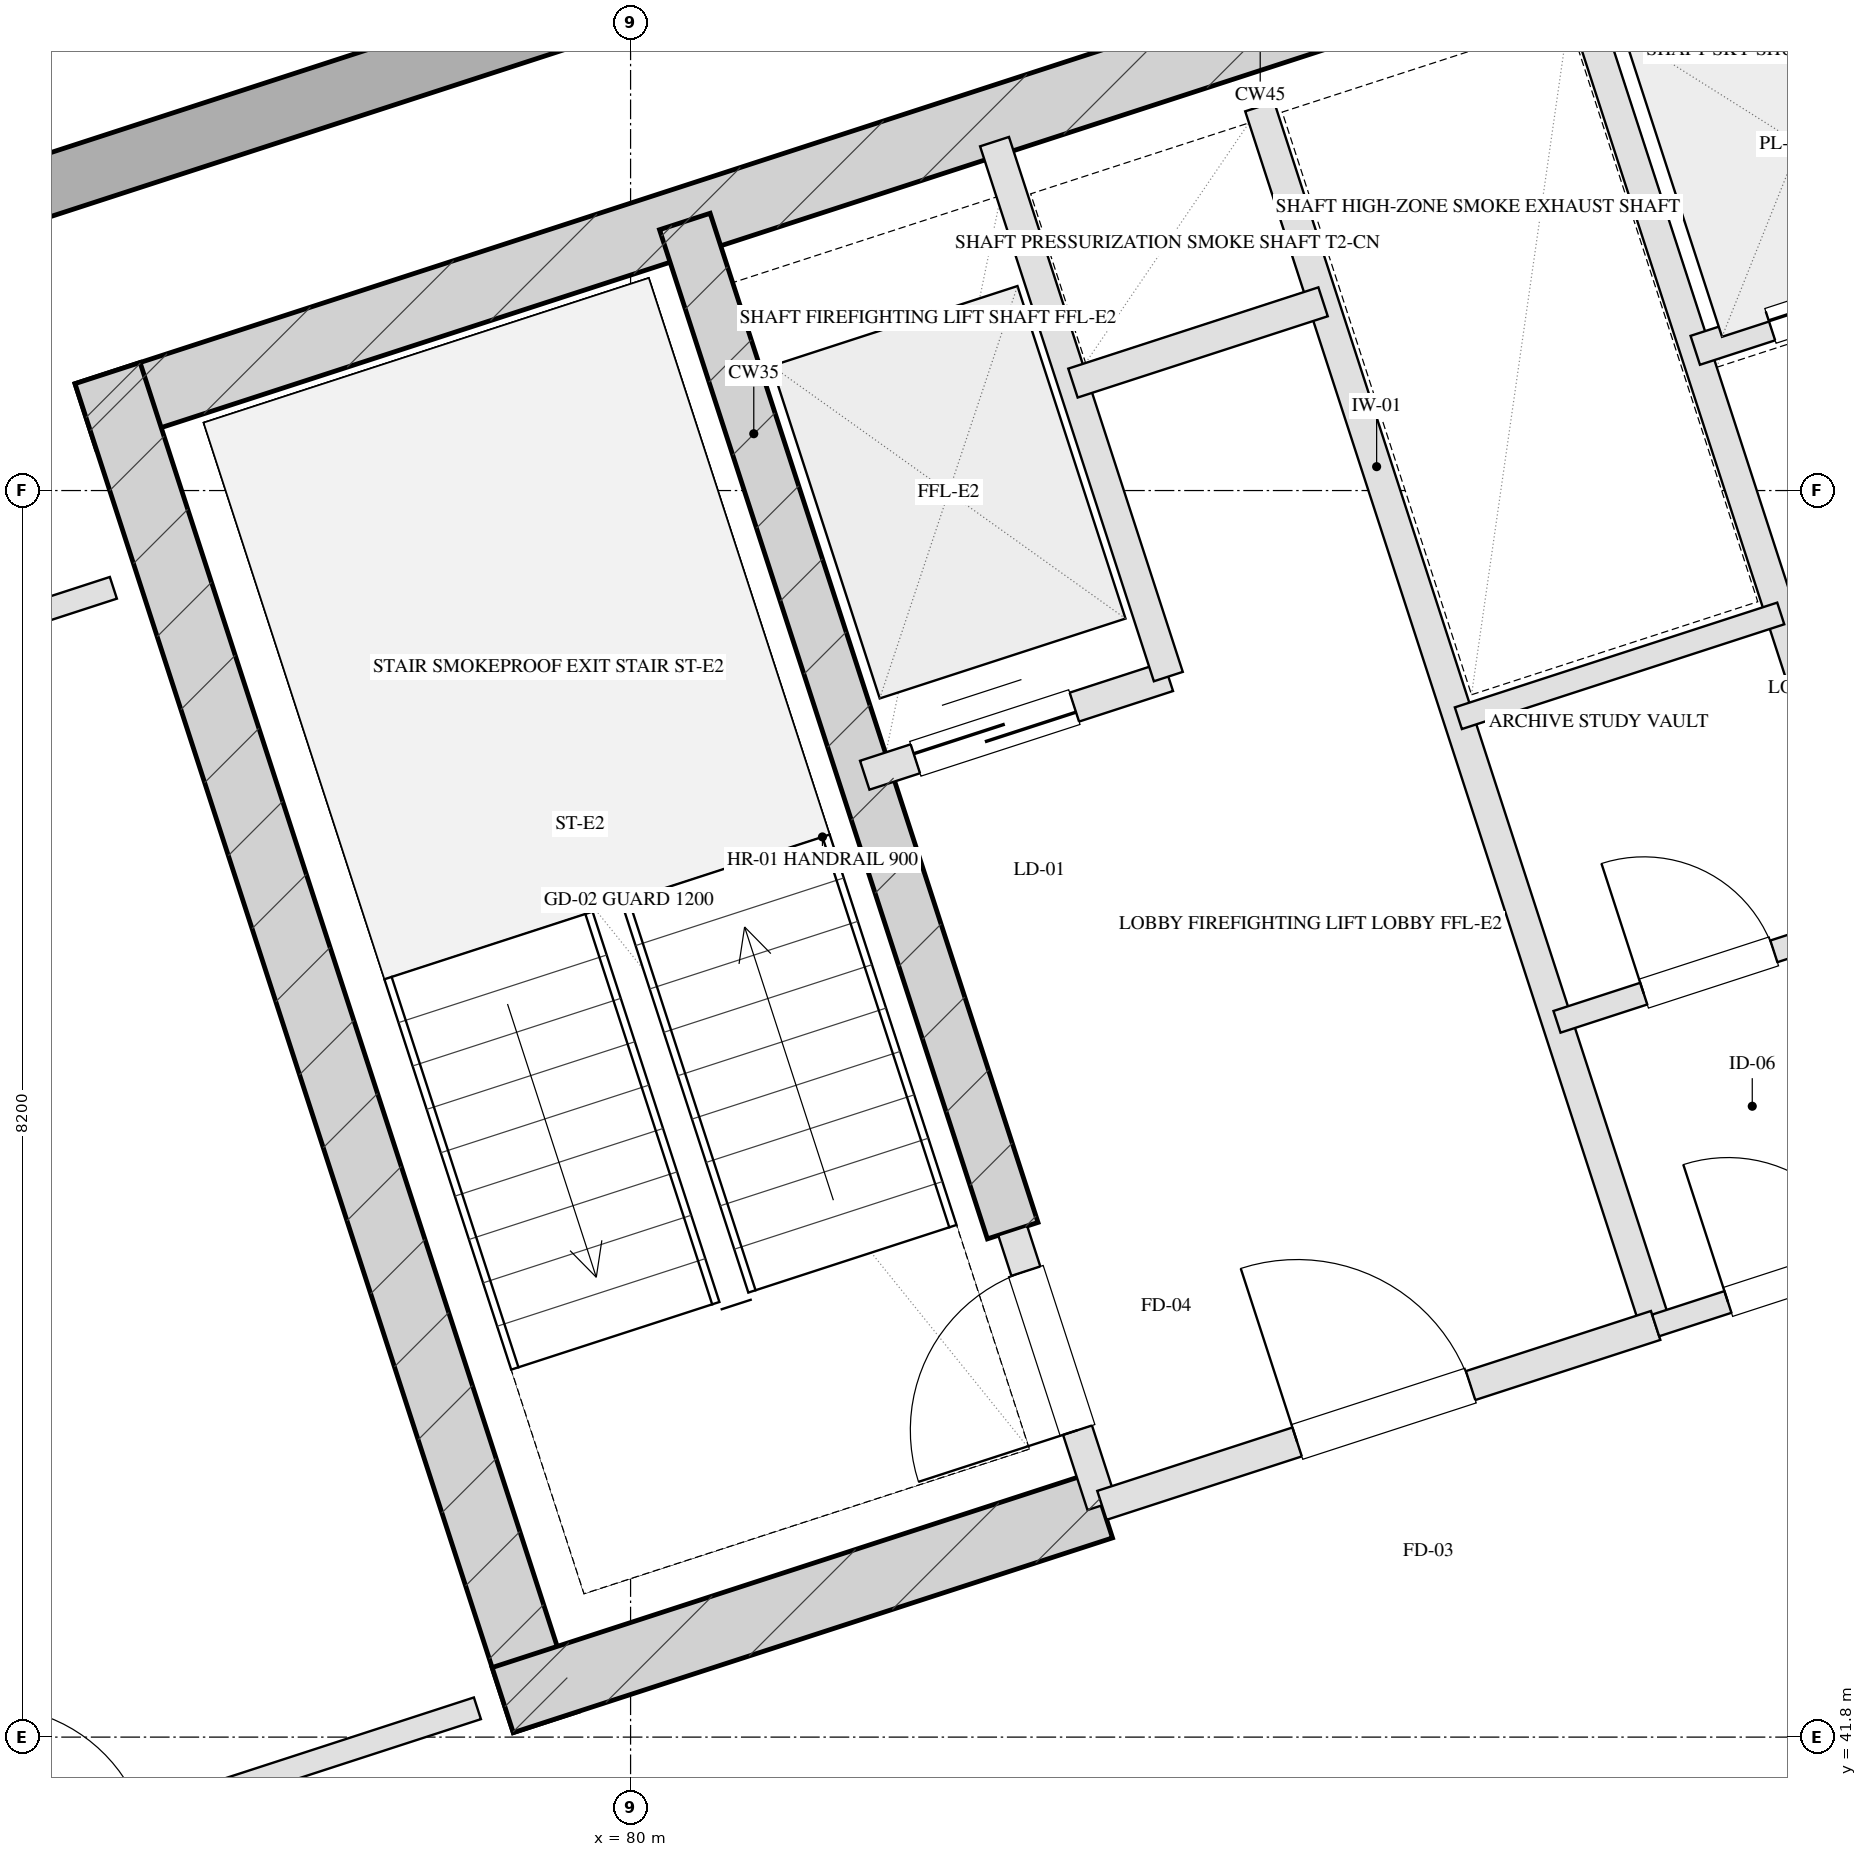
"""IFC4 building model, lengths in metres.
Left out: names, types, materials, properties, quantities, classifications, styles, units other than length and angle.
Written with IfcOpenShell. Run it as: python <this file> out.ifc"""

import sys

from ifc_helpers import new_model, si_unit, direction, frame, frame_2d, origin, place, context, subcontext, project, spatial, rectangle, extrude, element, fill, save


model = new_model("IFC4")
c1 = context("Model", 3, precision=1e-05, world=origin(), true_north=direction((0.0, 1.0)))
c2 = subcontext(c1, "Body", "Model", "MODEL_VIEW")
j1 = project(units=[si_unit("LENGTHUNIT", "METRE"), si_unit("PLANEANGLEUNIT", "RADIAN")], contexts=[c1])
p1 = place(None, origin())
s1 = spatial("IfcSite", under=j1, at=p1, CompositionType="ELEMENT")
p2 = place(p1, origin())
s2 = spatial("IfcBuilding", under=s1, at=p2, CompositionType="ELEMENT")
p3 = place(p2, frame((0.0, 0.0, 223.1)))
s3 = spatial("IfcBuildingStorey", under=s2, at=p3, CompositionType="ELEMENT", Elevation=223.1)
p4 = place(p3, frame((76.415, 50.489, 0.0), z_axis=(0.0, 0.0, 1.0), x_axis=(0.951056810414, 0.309016089169, 0.0)))
e1 = element("IfcWall", 1, at=p4, inside=s3, PredefinedType="SHEAR", context=c2, shape_type="SweptSolid", body=[
    extrude(rectangle(XDim=16.25, YDim=0.45, at=frame_2d((8.125, 0.0))), origin(), (0.0, 0.0, 1.0), 3.45),
])
p5 = place(p3, frame((79.442, 41.899, 0.0), z_axis=(0.0, 0.0, 1.0), x_axis=(-0.309035778627, 0.951050412717, 0.0)))
e2 = element("IfcWall", 2, at=p5, inside=s3, PredefinedType="SHEAR", context=c2, shape_type="SweptSolid", body=[
    extrude(rectangle(XDim=9.33, YDim=0.45, at=frame_2d((4.665, 0.0))), origin(), (0.0, 0.0, 1.0), 3.45),
])
p6 = place(p3, frame((82.514, 45.131, 0.0), z_axis=(0.0, 0.0, 1.0), x_axis=(-0.308988790936, 0.951065679686, 0.0)))
e3 = element("IfcWall", 3, at=p6, inside=s3, PredefinedType="SHEAR", context=c2, shape_type="SweptSolid", body=[
    extrude(rectangle(XDim=6.98, YDim=0.35, at=frame_2d((3.49, 0.0))), origin(), (0.0, 0.0, 1.0), 3.45),
])
p7 = place(p3, frame((79.159, 42.043, 0.0), z_axis=(0.0, 0.0, 1.0), x_axis=(0.951047485828, 0.309044785913, 0.0)))
e4 = element("IfcWall", 4, at=p7, inside=s3, PredefinedType="SHEAR", context=c2, shape_type="SweptSolid", body=[
    extrude(rectangle(XDim=4.145, YDim=0.45, at=frame_2d((2.073, 0.0))), origin(), (0.0, 0.0, 1.0), 3.45),
])
p8 = place(p3, frame((82.618, 11.414, 0.0), z_axis=(0.0, 0.0, 1.0), x_axis=(-0.309016491071, 0.951056679828, 0.0)))
e5 = element("IfcWall", 5, at=p8, inside=s3, PredefinedType="SOLIDWALL", context=c2, shape_type="SweptSolid", body=[
    extrude(rectangle(XDim=38.4, YDim=0.4, at=frame_2d((19.2, 0.0))), origin(), (0.0, 0.0, 1.0), 2.61),
])
p9 = place(p8, frame((11.75, 0.0, 0.75)))
e6 = element("IfcOpeningElement", 6, at=p9, cuts=e5, PredefinedType="OPENING", context=c2, shape_type="SweptSolid", body=[
    extrude(rectangle(XDim=2.1, YDim=1.46, at=frame_2d((1.05, 0.73))), frame((0.0, 0.21, 0.0), z_axis=(0.0, -1.0, 0.0), x_axis=(1.0, 0.0, 0.0)), (0.0, 0.0, 1.0), 0.42),
])
p10 = place(p8, frame((15.55, 0.0, 0.75)))
e7 = element("IfcOpeningElement", 7, at=p10, cuts=e5, PredefinedType="OPENING", context=c2, shape_type="SweptSolid", body=[
    extrude(rectangle(XDim=2.1, YDim=1.46, at=frame_2d((1.05, 0.73))), frame((0.0, 0.21, 0.0), z_axis=(0.0, -1.0, 0.0), x_axis=(1.0, 0.0, 0.0)), (0.0, 0.0, 1.0), 0.42),
])
p11 = place(p8, frame((20.75, 0.0, 0.75)))
e8 = element("IfcOpeningElement", 8, at=p11, cuts=e5, PredefinedType="OPENING", context=c2, shape_type="SweptSolid", body=[
    extrude(rectangle(XDim=2.1, YDim=1.46, at=frame_2d((1.05, 0.73))), frame((0.0, 0.21, 0.0), z_axis=(0.0, -1.0, 0.0), x_axis=(1.0, 0.0, 0.0)), (0.0, 0.0, 1.0), 0.42),
])
p12 = place(p8, frame((24.55, 0.0, 0.75)))
e9 = element("IfcOpeningElement", 9, at=p12, cuts=e5, PredefinedType="OPENING", context=c2, shape_type="SweptSolid", body=[
    extrude(rectangle(XDim=2.1, YDim=1.46, at=frame_2d((1.05, 0.73))), frame((0.0, 0.21, 0.0), z_axis=(0.0, -1.0, 0.0), x_axis=(1.0, 0.0, 0.0)), (0.0, 0.0, 1.0), 0.42),
])
p13 = place(p3, frame((72.165, 50.706, 0.0), z_axis=(0.0, 0.0, 1.0), x_axis=(0.951058012937, 0.309012388148, 0.0)))
e10 = element("IfcWall", 10, at=p13, inside=s3, PredefinedType="SOLIDWALL", context=c2, shape_type="SweptSolid", body=[
    extrude(rectangle(XDim=23.6, YDim=0.4, at=frame_2d((11.8, 0.0))), origin(), (0.0, 0.0, 1.0), 2.61),
])
p14 = place(p3, frame((83.101, 43.324, 0.0), z_axis=(0.0, 0.0, 1.0), x_axis=(-0.309048298632, 0.951046344356, 0.0)))
e11 = element("IfcWall", 11, at=p14, inside=s3, PredefinedType="PARTITIONING", context=c2, shape_type="SweptSolid", body=[
    extrude(rectangle(XDim=1.9, YDim=0.2, at=frame_2d((0.95, 0.0))), origin(), (0.0, 0.0, 1.0), 3.175),
])
p15 = place(p14, frame((0.52, 0.0, 0.0)))
e12 = element("IfcOpeningElement", 12, at=p15, cuts=e11, PredefinedType="OPENING", context=c2, shape_type="SweptSolid", body=[
    extrude(rectangle(XDim=1.1, YDim=2.05, at=frame_2d((0.55, 1.025))), frame((0.0, 0.11, 0.0), z_axis=(0.0, -1.0, 0.0), x_axis=(1.0, 0.0, 0.0)), (0.0, 0.0, 1.0), 0.22),
])
p16 = place(p3, frame((86.743, 44.508, 0.0), z_axis=(0.0, 0.0, 1.0), x_axis=(-0.309016001439, 0.951056838919, 0.0)))
e13 = element("IfcWall", 13, at=p16, inside=s3, PredefinedType="PARTITIONING", context=c2, shape_type="SweptSolid", body=[
    extrude(rectangle(XDim=8.43, YDim=0.2, at=frame_2d((4.215, 0.0))), origin(), (0.0, 0.0, 1.0), 3.175),
])
p17 = place(p3, frame((83.101, 43.324, 0.0), z_axis=(0.0, 0.0, 1.0), x_axis=(0.951052804469, 0.309028417967, 0.0)))
e14 = element("IfcWall", 14, at=p17, inside=s3, PredefinedType="PARTITIONING", context=c2, shape_type="SweptSolid", body=[
    extrude(rectangle(XDim=3.83, YDim=0.2, at=frame_2d((1.915, 0.0))), origin(), (0.0, 0.0, 1.0), 3.175),
])
p18 = place(p17, frame((1.35, 0.0, 0.0)))
e15 = element("IfcOpeningElement", 15, at=p18, cuts=e14, PredefinedType="OPENING", context=c2, shape_type="SweptSolid", body=[
    extrude(rectangle(XDim=1.2, YDim=2.05, at=frame_2d((0.6, 1.025))), frame((0.0, 0.11, 0.0), z_axis=(0.0, -1.0, 0.0), x_axis=(1.0, 0.0, 0.0)), (0.0, 0.0, 1.0), 0.22),
])
p19 = place(p3, frame((81.54, 48.127, 0.0), z_axis=(0.0, 0.0, 1.0), x_axis=(0.951062257173, 0.308999325213, 0.0)))
e16 = element("IfcWall", 16, at=p19, inside=s3, PredefinedType="PARTITIONING", context=c2, shape_type="SweptSolid", body=[
    extrude(rectangle(XDim=2.1, YDim=0.2, at=frame_2d((1.05, 0.0))), origin(), (0.0, 0.0, 1.0), 3.175),
])
p20 = place(p19, frame((0.35, 0.0, 0.0)))
e17 = element("IfcOpeningElement", 17, at=p20, cuts=e16, PredefinedType="OPENING", context=c2, shape_type="SweptSolid", body=[
    extrude(rectangle(XDim=1.1, YDim=2.05, at=frame_2d((0.55, 1.025))), frame((0.0, 0.11, 0.0), z_axis=(0.0, -1.0, 0.0), x_axis=(1.0, 0.0, 0.0)), (0.0, 0.0, 1.0), 0.22),
])
p21 = place(p3, frame((83.538, 48.776, 0.0), z_axis=(0.0, 0.0, 1.0), x_axis=(-0.3089935693, 0.951064127245, 0.0)))
e18 = element("IfcWall", 18, at=p21, inside=s3, PredefinedType="PARTITIONING", context=c2, shape_type="SweptSolid", body=[
    extrude(rectangle(XDim=3.7, YDim=0.2, at=frame_2d((1.85, 0.0))), origin(), (0.0, 0.0, 1.0), 3.175),
])
p22 = place(p3, frame((82.91, 50.707, 0.0), z_axis=(0.0, 0.0, 1.0), x_axis=(0.951041328149, 0.309063734775, 0.0)))
e19 = element("IfcWall", 19, at=p22, inside=s3, PredefinedType="PARTITIONING", context=c2, shape_type="SweptSolid", body=[
    extrude(rectangle(XDim=1.73, YDim=0.2, at=frame_2d((0.865, 0.0))), origin(), (0.0, 0.0, 1.0), 3.175),
])
p23 = place(p3, frame((88.864, 45.197, 0.0), z_axis=(0.0, 0.0, 1.0), x_axis=(-0.309007490203, 0.951059604335, 0.0)))
e20 = element("IfcWall", 20, at=p23, inside=s3, PredefinedType="PARTITIONING", context=c2, shape_type="SweptSolid", body=[
    extrude(rectangle(XDim=8.43, YDim=0.2, at=frame_2d((4.215, 0.0))), origin(), (0.0, 0.0, 1.0), 3.175),
])
p24 = place(p3, frame((86.743, 44.508, 0.0), z_axis=(0.0, 0.0, 1.0), x_axis=(0.951063829732, 0.308994485023, 0.0)))
e21 = element("IfcWall", 21, at=p24, inside=s3, PredefinedType="PARTITIONING", context=c2, shape_type="SweptSolid", body=[
    extrude(rectangle(XDim=4.4, YDim=0.15, at=frame_2d((2.2, 0.0))), origin(), (0.0, 0.0, 1.0), 3.175),
])
p25 = place(p24, frame((0.5, 0.0, 0.0)))
e22 = element("IfcOpeningElement", 22, at=p25, cuts=e21, PredefinedType="OPENING", context=c2, shape_type="SweptSolid", body=[
    extrude(rectangle(XDim=0.95, YDim=2.05, at=frame_2d((0.475, 1.025))), frame((0.0, 0.085, 0.0), z_axis=(0.0, -1.0, 0.0), x_axis=(1.0, 0.0, 0.0)), (0.0, 0.0, 1.0), 0.17),
])
p26 = place(p24, frame((2.65, 0.0, 0.0)))
e23 = element("IfcOpeningElement", 23, at=p26, cuts=e21, PredefinedType="OPENING", context=c2, shape_type="SweptSolid", body=[
    extrude(rectangle(XDim=1.2, YDim=2.05, at=frame_2d((0.6, 1.025))), frame((0.0, 0.085, 0.0), z_axis=(0.0, -1.0, 0.0), x_axis=(1.0, 0.0, 0.0)), (0.0, 0.0, 1.0), 0.17),
])
p27 = place(p3, frame((85.446, 48.502, 0.0), z_axis=(0.0, 0.0, 1.0), x_axis=(0.951075093106, 0.308959814982, 0.0)))
e24 = element("IfcWall", 24, at=p27, inside=s3, PredefinedType="PARTITIONING", context=c2, shape_type="SweptSolid", body=[
    extrude(rectangle(XDim=2.23, YDim=0.15, at=frame_2d((1.115, 0.0))), origin(), (0.0, 0.0, 1.0), 3.175),
])
p28 = place(p3, frame((86.094, 46.505, 0.0), z_axis=(0.0, 0.0, 1.0), x_axis=(0.951042918244, 0.309058841741, 0.0)))
e25 = element("IfcWall", 25, at=p28, inside=s3, PredefinedType="PARTITIONING", context=c2, shape_type="SweptSolid", body=[
    extrude(rectangle(XDim=2.23, YDim=0.15, at=frame_2d((1.115, 0.0))), origin(), (0.0, 0.0, 1.0), 3.175),
])
p29 = place(p28, frame((0.6, 0.0, 0.0)))
e26 = element("IfcOpeningElement", 26, at=p29, cuts=e25, PredefinedType="OPENING", context=c2, shape_type="SweptSolid", body=[
    extrude(rectangle(XDim=0.9, YDim=2.05, at=frame_2d((0.45, 1.025))), frame((0.0, 0.085, 0.0), z_axis=(0.0, -1.0, 0.0), x_axis=(1.0, 0.0, 0.0)), (0.0, 0.0, 1.0), 0.17),
])
p30 = place(p3, frame((87.004, 50.922, 0.0), z_axis=(0.0, 0.0, 1.0), x_axis=(0.951041509718, 0.309063176055, 0.0)))
e27 = element("IfcWall", 27, at=p30, inside=s3, PredefinedType="PARTITIONING", context=c2, shape_type="SweptSolid", body=[
    extrude(rectangle(XDim=2.17, YDim=0.2, at=frame_2d((1.085, 0.0))), origin(), (0.0, 0.0, 1.0), 3.175),
])
p31 = place(p30, frame((0.52, 0.0, 0.0)))
e28 = element("IfcOpeningElement", 28, at=p31, cuts=e27, PredefinedType="OPENING", context=c2, shape_type="SweptSolid", body=[
    extrude(rectangle(XDim=1.1, YDim=2.05, at=frame_2d((0.55, 1.025))), frame((0.0, 0.11, 0.0), z_axis=(0.0, -1.0, 0.0), x_axis=(1.0, 0.0, 0.0)), (0.0, 0.0, 1.0), 0.22),
])
p32 = place(p3, frame((71.081, 47.568, 0.0), z_axis=(0.0, 0.0, 1.0), x_axis=(0.951059431056, 0.309008023519, 0.0)))
e29 = element("IfcWall", 29, at=p32, inside=s3, PredefinedType="PARTITIONING", context=c2, shape_type="SweptSolid", body=[
    extrude(rectangle(XDim=5.8, YDim=0.15, at=frame_2d((2.9, 0.0))), origin(), (0.0, 0.0, 1.0), 3.175),
])
p33 = place(p3, frame((73.476, 40.197, 0.0), z_axis=(0.0, 0.0, 1.0), x_axis=(0.951059431056, 0.309008023519, 0.0)))
e30 = element("IfcWall", 30, at=p33, inside=s3, PredefinedType="PARTITIONING", context=c2, shape_type="SweptSolid", body=[
    extrude(rectangle(XDim=5.8, YDim=0.15, at=frame_2d((2.9, 0.0))), origin(), (0.0, 0.0, 1.0), 3.175),
])
p34 = place(p33, frame((2.436, 0.0, 0.0)))
e31 = element("IfcOpeningElement", 31, at=p34, cuts=e30, PredefinedType="OPENING", context=c2, shape_type="SweptSolid", body=[
    extrude(rectangle(XDim=1.05, YDim=2.05, at=frame_2d((0.525, 1.025))), frame((0.0, 0.085, 0.0), z_axis=(0.0, -1.0, 0.0), x_axis=(1.0, 0.0, 0.0)), (0.0, 0.0, 1.0), 0.17),
])
p35 = place(p15, origin())
e32 = element("IfcDoor", 32, at=p35, inside=s3, OperationType="SINGLE_SWING_LEFT", PredefinedType="DOOR", context=c2, shape_type="SweptSolid", body=[
    extrude(rectangle(XDim=1.1, YDim=2.05, at=frame_2d((0.55, 1.025))), frame((0.0, 0.025, 0.0), z_axis=(0.0, -1.0, 0.0), x_axis=(1.0, 0.0, 0.0)), (0.0, 0.0, 1.0), 0.05),
])
fill(e12, e32)
p36 = place(p18, origin())
e33 = element("IfcDoor", 33, at=p36, inside=s3, OperationType="SINGLE_SWING_LEFT", PredefinedType="DOOR", context=c2, shape_type="SweptSolid", body=[
    extrude(rectangle(XDim=1.2, YDim=2.05, at=frame_2d((0.6, 1.025))), frame((0.0, 0.025, 0.0), z_axis=(0.0, -1.0, 0.0), x_axis=(1.0, 0.0, 0.0)), (0.0, 0.0, 1.0), 0.05),
])
fill(e15, e33)
p37 = place(p20, origin())
e34 = element("IfcDoor", 34, at=p37, inside=s3, OperationType="DOUBLE_DOOR_SLIDING", PredefinedType="DOOR", context=c2, shape_type="SweptSolid", body=[
    extrude(rectangle(XDim=1.1, YDim=2.05, at=frame_2d((0.55, 1.025))), frame((0.0, 0.025, 0.0), z_axis=(0.0, -1.0, 0.0), x_axis=(1.0, 0.0, 0.0)), (0.0, 0.0, 1.0), 0.05),
])
fill(e17, e34)
p38 = place(p25, origin())
e35 = element("IfcDoor", 35, at=p38, inside=s3, OperationType="SINGLE_SWING_LEFT", PredefinedType="DOOR", context=c2, shape_type="SweptSolid", body=[
    extrude(rectangle(XDim=0.95, YDim=2.05, at=frame_2d((0.475, 1.025))), frame((0.0, 0.025, 0.0), z_axis=(0.0, -1.0, 0.0), x_axis=(1.0, 0.0, 0.0)), (0.0, 0.0, 1.0), 0.05),
])
fill(e22, e35)
p39 = place(p29, origin())
e36 = element("IfcDoor", 36, at=p39, inside=s3, OperationType="SINGLE_SWING_LEFT", PredefinedType="DOOR", context=c2, shape_type="SweptSolid", body=[
    extrude(rectangle(XDim=0.9, YDim=2.05, at=frame_2d((0.45, 1.025))), frame((0.0, 0.025, 0.0), z_axis=(0.0, -1.0, 0.0), x_axis=(1.0, 0.0, 0.0)), (0.0, 0.0, 1.0), 0.05),
])
fill(e26, e36)
p40 = place(p31, origin())
e37 = element("IfcDoor", 37, at=p40, inside=s3, OperationType="DOUBLE_DOOR_SLIDING", PredefinedType="DOOR", context=c2, shape_type="SweptSolid", body=[
    extrude(rectangle(XDim=1.1, YDim=2.05, at=frame_2d((0.55, 1.025))), frame((0.0, 0.025, 0.0), z_axis=(0.0, -1.0, 0.0), x_axis=(1.0, 0.0, 0.0)), (0.0, 0.0, 1.0), 0.05),
])
fill(e28, e37)
save(model, sys.argv[1])
